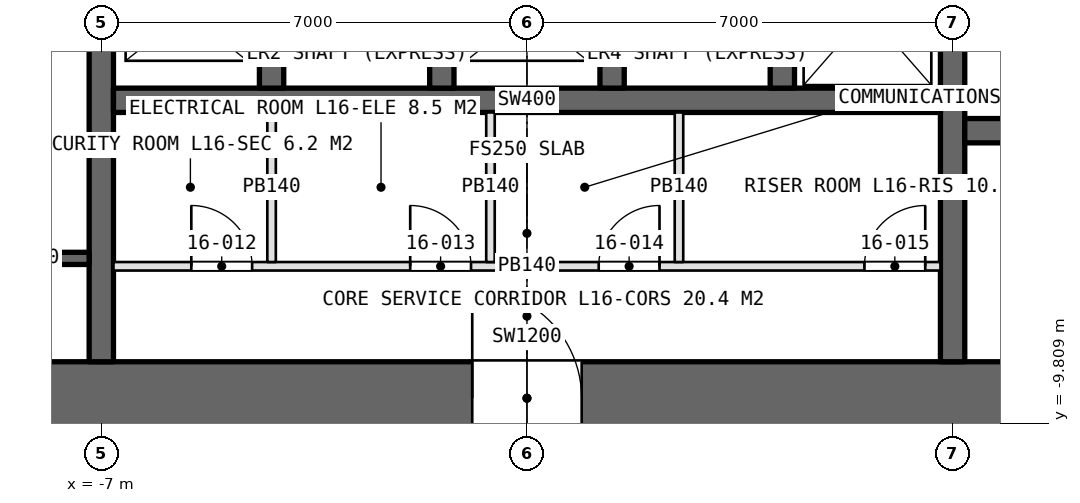
"""IFC4 building model, lengths in metres.
Left out: names, types, materials, properties, quantities, classifications, styles, units other than length and angle.
Written with IfcOpenShell. Run it as: python <this file> out.ifc"""

import sys

from ifc_helpers import new_model, si_unit, direction, frame, frame_2d, origin, place, context, subcontext, project, spatial, rectangle, extrude, element, fill, save


model = new_model("IFC4")
c1 = context("Model", 3, precision=1e-05, world=origin(), true_north=direction((0.0, 1.0)))
c2 = subcontext(c1, "Body", "Model", "MODEL_VIEW")
j1 = project(units=[si_unit("LENGTHUNIT", "METRE"), si_unit("PLANEANGLEUNIT", "RADIAN")], contexts=[c1])
p1 = place(None, origin())
s1 = spatial("IfcSite", under=j1, at=p1, CompositionType="ELEMENT")
p2 = place(p1, origin())
s2 = spatial("IfcBuilding", under=s1, at=p2, CompositionType="ELEMENT")
p3 = place(p2, frame((0.0, 0.0, 80.0)))
s3 = spatial("IfcBuildingStorey", under=s2, at=p3, CompositionType="ELEMENT", Elevation=80.0)
p4 = place(p3, frame((-14.0, -9.4, 0.0), z_axis=(0.0, 0.0, 1.0), x_axis=(1.0, 0.0, 0.0)))
e1 = element("IfcWall", 1, at=p4, inside=s3, PredefinedType="SHEAR", context=c2, shape_type="SweptSolid", body=[
    extrude(rectangle(XDim=28.0, YDim=1.2, at=frame_2d((14.0, 0.0))), origin(), (0.0, 0.0, 1.0), 5.0),
])
p5 = place(p4, frame((13.1, 0.0, 0.0)))
e2 = element("IfcOpeningElement", 2, at=p5, cuts=e1, PredefinedType="OPENING", context=c2, shape_type="SweptSolid", body=[
    extrude(rectangle(XDim=1.8, YDim=2.4, at=frame_2d((0.9, 1.2))), frame((0.0, 0.61, 0.0), z_axis=(0.0, -1.0, 0.0), x_axis=(1.0, 0.0, 0.0)), (0.0, 0.0, 1.0), 1.22),
])
p6 = place(p4, frame((22.9, 0.0, 0.0)))
e3 = element("IfcOpeningElement", 3, at=p6, cuts=e1, PredefinedType="OPENING", context=c2, shape_type="SweptSolid", body=[
    extrude(rectangle(XDim=2.2, YDim=2.7, at=frame_2d((1.1, 1.35))), frame((0.0, 0.61, 0.0), z_axis=(0.0, -1.0, 0.0), x_axis=(1.0, 0.0, 0.0)), (0.0, 0.0, 1.0), 1.22),
])
p7 = place(p3, frame((-7.0, -8.8, 0.0), z_axis=(0.0, 0.0, 1.0), x_axis=(0.0, 1.0, 0.0)))
e4 = element("IfcWall", 4, at=p7, inside=s3, PredefinedType="SHEAR", context=c2, shape_type="SweptSolid", body=[
    extrude(rectangle(XDim=17.6, YDim=0.4, at=frame_2d((8.8, 0.0))), origin(), (0.0, 0.0, 1.0), 5.0),
])
p8 = place(p7, frame((7.9, 0.0, 0.0)))
e5 = element("IfcOpeningElement", 5, at=p8, cuts=e4, PredefinedType="OPENING", context=c2, shape_type="SweptSolid", body=[
    extrude(rectangle(XDim=1.8, YDim=2.4, at=frame_2d((0.9, 1.2))), frame((0.0, 0.21, 0.0), z_axis=(0.0, -1.0, 0.0), x_axis=(1.0, 0.0, 0.0)), (0.0, 0.0, 1.0), 0.42),
])
p9 = place(p3, frame((7.0, -8.8, 0.0), z_axis=(0.0, 0.0, 1.0), x_axis=(0.0, 1.0, 0.0)))
e6 = element("IfcWall", 6, at=p9, inside=s3, PredefinedType="SHEAR", context=c2, shape_type="SweptSolid", body=[
    extrude(rectangle(XDim=17.6, YDim=0.4, at=frame_2d((8.8, 0.0))), origin(), (0.0, 0.0, 1.0), 5.0),
])
p10 = place(p9, frame((7.9, 0.0, 0.0)))
e7 = element("IfcOpeningElement", 7, at=p10, cuts=e6, PredefinedType="OPENING", context=c2, shape_type="SweptSolid", body=[
    extrude(rectangle(XDim=1.8, YDim=2.4, at=frame_2d((0.9, 1.2))), frame((0.0, 0.21, 0.0), z_axis=(0.0, -1.0, 0.0), x_axis=(1.0, 0.0, 0.0)), (0.0, 0.0, 1.0), 0.42),
])
p11 = place(p3, frame((-6.8, -4.5, 0.0), z_axis=(0.0, 0.0, 1.0), x_axis=(1.0, 0.0, 0.0)))
e8 = element("IfcWall", 8, at=p11, inside=s3, PredefinedType="SHEAR", context=c2, shape_type="SweptSolid", body=[
    extrude(rectangle(XDim=13.6, YDim=0.4, at=frame_2d((6.8, 0.0))), origin(), (0.0, 0.0, 1.0), 5.0),
])
p12 = place(p3, frame((7.2, -5.0, 0.0), z_axis=(0.0, 0.0, 1.0), x_axis=(1.0, 0.0, 0.0)))
e9 = element("IfcWall", 9, at=p12, inside=s3, PredefinedType="SHEAR", context=c2, shape_type="SweptSolid", body=[
    extrude(rectangle(XDim=5.6, YDim=0.4, at=frame_2d((2.8, 0.0))), origin(), (0.0, 0.0, 1.0), 5.0),
])
for number, where, z_axis, x_axis in (
    (10, (-4.2, -4.3, 0.0), (0.0, 0.0, 1.0), (0.0, 1.0, 0.0)),
    (11, (-1.4, -4.3, 0.0), (0.0, 0.0, 1.0), (0.0, 1.0, 0.0)),
    (12, (1.4, -4.3, 0.0), (0.0, 0.0, 1.0), (0.0, 1.0, 0.0)),
    (13, (4.2, -4.3, 0.0), (0.0, 0.0, 1.0), (0.0, 1.0, 0.0)),
):
    element("IfcWall", number, at=place(p3, frame(where, z_axis=z_axis, x_axis=x_axis)), inside=s3, PredefinedType="SHEAR", context=c2, shape_type="SweptSolid", body=[
        extrude(rectangle(XDim=2.5, YDim=0.4, at=frame_2d((1.25, 0.0))), origin(), (0.0, 0.0, 1.0), 5.0),
    ])
p13 = place(p3, frame((-6.8, -7.23, 0.0), z_axis=(0.0, 0.0, 1.0), x_axis=(1.0, 0.0, 0.0)))
e14 = element("IfcWall", 14, at=p13, inside=s3, PredefinedType="PARTITIONING", context=c2, shape_type="SweptSolid", body=[
    extrude(rectangle(XDim=13.6, YDim=0.14, at=frame_2d((6.8, 0.0))), origin(), (0.0, 0.0, 1.0), 4.75),
])
p14 = place(p13, frame((1.28, 0.0, 0.0)))
e15 = element("IfcOpeningElement", 15, at=p14, cuts=e14, PredefinedType="OPENING", context=c2, shape_type="SweptSolid", body=[
    extrude(rectangle(XDim=1.0, YDim=2.4, at=frame_2d((0.5, 1.2))), frame((0.0, 0.08, 0.0), z_axis=(0.0, -1.0, 0.0), x_axis=(1.0, 0.0, 0.0)), (0.0, 0.0, 1.0), 0.16),
])
p15 = place(p13, frame((4.88, 0.0, 0.0)))
e16 = element("IfcOpeningElement", 16, at=p15, cuts=e14, PredefinedType="OPENING", context=c2, shape_type="SweptSolid", body=[
    extrude(rectangle(XDim=1.0, YDim=2.4, at=frame_2d((0.5, 1.2))), frame((0.0, 0.08, 0.0), z_axis=(0.0, -1.0, 0.0), x_axis=(1.0, 0.0, 0.0)), (0.0, 0.0, 1.0), 0.16),
])
p16 = place(p13, frame((7.98, 0.0, 0.0)))
e17 = element("IfcOpeningElement", 17, at=p16, cuts=e14, PredefinedType="OPENING", context=c2, shape_type="SweptSolid", body=[
    extrude(rectangle(XDim=1.0, YDim=2.4, at=frame_2d((0.5, 1.2))), frame((0.0, 0.08, 0.0), z_axis=(0.0, -1.0, 0.0), x_axis=(1.0, 0.0, 0.0)), (0.0, 0.0, 1.0), 0.16),
])
p17 = place(p13, frame((12.35, 0.0, 0.0)))
e18 = element("IfcOpeningElement", 18, at=p17, cuts=e14, PredefinedType="OPENING", context=c2, shape_type="SweptSolid", body=[
    extrude(rectangle(XDim=1.0, YDim=2.4, at=frame_2d((0.5, 1.2))), frame((0.0, 0.08, 0.0), z_axis=(0.0, -1.0, 0.0), x_axis=(1.0, 0.0, 0.0)), (0.0, 0.0, 1.0), 0.16),
])
for number, where, z_axis, x_axis in (
    (19, (-4.2, -4.7, 0.0), (0.0, 0.0, 1.0), (0.0, -1.0, 0.0)),
    (20, (-0.6, -4.7, 0.0), (0.0, 0.0, 1.0), (0.0, -1.0, 0.0)),
    (21, (2.5, -4.7, 0.0), (0.0, 0.0, 1.0), (0.0, -1.0, 0.0)),
):
    element("IfcWall", number, at=place(p3, frame(where, z_axis=z_axis, x_axis=x_axis)), inside=s3, PredefinedType="PARTITIONING", context=c2, shape_type="SweptSolid", body=[
        extrude(rectangle(XDim=2.46, YDim=0.14, at=frame_2d((1.23, 0.0))), origin(), (0.0, 0.0, 1.0), 4.75),
    ])
p18 = place(p3, frame((-9.15, -7.1, 0.0), z_axis=(0.0, 0.0, 1.0), x_axis=(1.0, 0.0, 0.0)))
e22 = element("IfcWall", 22, at=p18, inside=s3, PredefinedType="SOLIDWALL", context=c2, shape_type="SweptSolid", body=[
    extrude(rectangle(XDim=1.95, YDim=0.2, at=frame_2d((0.975, 0.0))), origin(), (0.0, 0.0, 1.0), 5.0),
])
p19 = place(p14, origin())
e23 = element("IfcDoor", 23, at=p19, inside=s3, OperationType="SINGLE_SWING_LEFT", PredefinedType="DOOR", context=c2, shape_type="SweptSolid", body=[
    extrude(rectangle(XDim=1.0, YDim=2.4, at=frame_2d((0.5, 1.2))), frame((0.0, 0.025, 0.0), z_axis=(0.0, -1.0, 0.0), x_axis=(1.0, 0.0, 0.0)), (0.0, 0.0, 1.0), 0.05),
])
fill(e15, e23)
p20 = place(p15, origin())
e24 = element("IfcDoor", 24, at=p20, inside=s3, OperationType="SINGLE_SWING_LEFT", PredefinedType="DOOR", context=c2, shape_type="SweptSolid", body=[
    extrude(rectangle(XDim=1.0, YDim=2.4, at=frame_2d((0.5, 1.2))), frame((0.0, 0.025, 0.0), z_axis=(0.0, -1.0, 0.0), x_axis=(1.0, 0.0, 0.0)), (0.0, 0.0, 1.0), 0.05),
])
fill(e16, e24)
p21 = place(p16, origin())
e25 = element("IfcDoor", 25, at=p21, inside=s3, OperationType="SINGLE_SWING_RIGHT", PredefinedType="DOOR", context=c2, shape_type="SweptSolid", body=[
    extrude(rectangle(XDim=1.0, YDim=2.4, at=frame_2d((0.5, 1.2))), frame((0.0, 0.025, 0.0), z_axis=(0.0, -1.0, 0.0), x_axis=(1.0, 0.0, 0.0)), (0.0, 0.0, 1.0), 0.05),
])
fill(e17, e25)
p22 = place(p17, origin())
e26 = element("IfcDoor", 26, at=p22, inside=s3, OperationType="SINGLE_SWING_RIGHT", PredefinedType="DOOR", context=c2, shape_type="SweptSolid", body=[
    extrude(rectangle(XDim=1.0, YDim=2.4, at=frame_2d((0.5, 1.2))), frame((0.0, 0.025, 0.0), z_axis=(0.0, -1.0, 0.0), x_axis=(1.0, 0.0, 0.0)), (0.0, 0.0, 1.0), 0.05),
])
fill(e18, e26)
p23 = place(p5, origin())
e27 = element("IfcDoor", 27, at=p23, inside=s3, OperationType="DOUBLE_DOOR_SINGLE_SWING", PredefinedType="DOOR", context=c2, shape_type="SweptSolid", body=[
    extrude(rectangle(XDim=1.8, YDim=2.4, at=frame_2d((0.9, 1.2))), frame((0.0, 0.025, 0.0), z_axis=(0.0, -1.0, 0.0), x_axis=(1.0, 0.0, 0.0)), (0.0, 0.0, 1.0), 0.05),
])
fill(e2, e27)
save(model, sys.argv[1])
